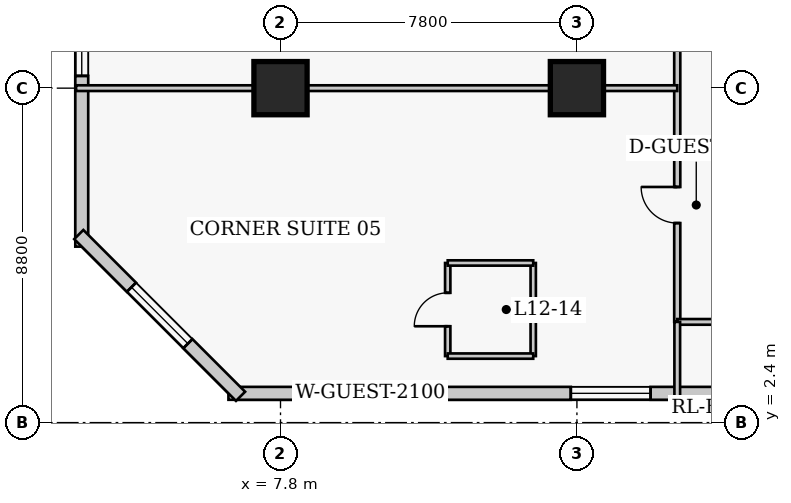
"""IFC4 building model, lengths in metres.
Left out: names, types, materials, properties, quantities, classifications, styles, units other than length and angle.
Written with IfcOpenShell. Run it as: python <this file> out.ifc"""

import sys

from ifc_helpers import new_model, si_unit, direction, frame, frame_2d, origin, origin_2d, place, context, subcontext, project, spatial, rectangle, extrude, element, fill, save


model = new_model("IFC4")
c1 = context("Model", 3, precision=1e-05, world=origin(), true_north=direction((0.0, 1.0)))
c2 = subcontext(c1, "Body", "Model", "MODEL_VIEW")
j1 = project(units=[si_unit("LENGTHUNIT", "METRE"), si_unit("PLANEANGLEUNIT", "RADIAN")], contexts=[c1])
p1 = place(None, origin())
s1 = spatial("IfcSite", under=j1, at=p1, CompositionType="ELEMENT")
p2 = place(p1, origin())
s2 = spatial("IfcBuilding", under=s1, at=p2, CompositionType="ELEMENT")
p3 = place(p2, frame((0.0, 0.0, 52.6)))
s3 = spatial("IfcBuildingStorey", under=s2, at=p3, CompositionType="ELEMENT", Elevation=52.6)
for number, where, z_axis, x_axis in (
    (1, (7.8, 11.2, 0.0), (0.0, 0.0, 1.0), (1.0, 0.0, 0.0)),
    (2, (15.6, 11.2, 0.0), (0.0, 0.0, 1.0), (1.0, 0.0, 0.0)),
):
    element("IfcColumn", number, at=place(p3, frame(where, z_axis=z_axis, x_axis=x_axis)), inside=s3, PredefinedType="COLUMN", context=c2, shape_type="SweptSolid", body=[
        extrude(rectangle(XDim=1.4, YDim=1.4, at=origin_2d()), origin(), (0.0, 0.0, 1.0), 3.8),
    ])
p4 = place(p3, frame((6.43, 3.17, 0.0), z_axis=(0.0, 0.0, 1.0), x_axis=(1.0, 0.0, 0.0)))
e3 = element("IfcWall", 3, at=p4, inside=s3, PredefinedType="SOLIDWALL", context=c2, shape_type="SweptSolid", body=[
    extrude(rectangle(XDim=29.89, YDim=0.34, at=frame_2d((14.945, 0.0))), origin(), (0.0, 0.0, 1.0), 3.54),
])
p5 = place(p4, frame((19.42, 0.0, 0.0)))
e4 = element("IfcOpeningElement", 4, at=p5, cuts=e3, PredefinedType="OPENING", context=c2, shape_type="SweptSolid", body=[
    extrude(rectangle(XDim=1.4, YDim=2.15, at=frame_2d((0.7, 1.075))), frame((0.0, 0.18, 0.0), z_axis=(0.0, -1.0, 0.0), x_axis=(1.0, 0.0, 0.0)), (0.0, 0.0, 1.0), 0.36),
])
p6 = place(p4, frame((2.686, 0.0, 0.85)))
e5 = element("IfcOpeningElement", 5, at=p6, cuts=e3, PredefinedType="OPENING", context=c2, shape_type="SweptSolid", body=[
    extrude(rectangle(XDim=2.1, YDim=1.85, at=frame_2d((1.05, 0.925))), frame((0.0, 0.18, 0.0), z_axis=(0.0, -1.0, 0.0), x_axis=(1.0, 0.0, 0.0)), (0.0, 0.0, 1.0), 0.36),
])
p7 = place(p4, frame((9.009, 0.0, 0.85)))
e6 = element("IfcOpeningElement", 6, at=p7, cuts=e3, PredefinedType="OPENING", context=c2, shape_type="SweptSolid", body=[
    extrude(rectangle(XDim=2.1, YDim=1.85, at=frame_2d((1.05, 0.925))), frame((0.0, 0.18, 0.0), z_axis=(0.0, -1.0, 0.0), x_axis=(1.0, 0.0, 0.0)), (0.0, 0.0, 1.0), 0.36),
])
p8 = place(p4, frame((25.104, 0.0, 0.85)))
e7 = element("IfcOpeningElement", 7, at=p8, cuts=e3, PredefinedType="OPENING", context=c2, shape_type="SweptSolid", body=[
    extrude(rectangle(XDim=2.1, YDim=1.85, at=frame_2d((1.05, 0.925))), frame((0.0, 0.18, 0.0), z_axis=(0.0, -1.0, 0.0), x_axis=(1.0, 0.0, 0.0)), (0.0, 0.0, 1.0), 0.36),
])
p9 = place(p3, frame((2.57, 42.17, 0.0), z_axis=(0.0, 0.0, 1.0), x_axis=(0.0, -1.0, 0.0)))
e8 = element("IfcWall", 8, at=p9, inside=s3, PredefinedType="SOLIDWALL", context=c2, shape_type="SweptSolid", body=[
    extrude(rectangle(XDim=35.14, YDim=0.34, at=frame_2d((17.57, 0.0))), origin(), (0.0, 0.0, 1.0), 3.54),
])
p10 = place(p9, frame((3.343, 0.0, 0.85)))
e9 = element("IfcOpeningElement", 9, at=p10, cuts=e8, PredefinedType="OPENING", context=c2, shape_type="SweptSolid", body=[
    extrude(rectangle(XDim=2.1, YDim=1.85, at=frame_2d((1.05, 0.925))), frame((0.0, 0.18, 0.0), z_axis=(0.0, -1.0, 0.0), x_axis=(1.0, 0.0, 0.0)), (0.0, 0.0, 1.0), 0.36),
])
p11 = place(p9, frame((10.978, 0.0, 0.85)))
e10 = element("IfcOpeningElement", 10, at=p11, cuts=e8, PredefinedType="OPENING", context=c2, shape_type="SweptSolid", body=[
    extrude(rectangle(XDim=2.1, YDim=1.85, at=frame_2d((1.05, 0.925))), frame((0.0, 0.18, 0.0), z_axis=(0.0, -1.0, 0.0), x_axis=(1.0, 0.0, 0.0)), (0.0, 0.0, 1.0), 0.36),
])
p12 = place(p9, frame((19.762, 0.0, 0.85)))
e11 = element("IfcOpeningElement", 11, at=p12, cuts=e8, PredefinedType="OPENING", context=c2, shape_type="SweptSolid", body=[
    extrude(rectangle(XDim=2.1, YDim=1.85, at=frame_2d((1.05, 0.925))), frame((0.0, 0.18, 0.0), z_axis=(0.0, -1.0, 0.0), x_axis=(1.0, 0.0, 0.0)), (0.0, 0.0, 1.0), 0.36),
])
p13 = place(p9, frame((28.548, 0.0, 0.85)))
e12 = element("IfcOpeningElement", 12, at=p13, cuts=e8, PredefinedType="OPENING", context=c2, shape_type="SweptSolid", body=[
    extrude(rectangle(XDim=2.1, YDim=1.85, at=frame_2d((1.05, 0.925))), frame((0.0, 0.18, 0.0), z_axis=(0.0, -1.0, 0.0), x_axis=(1.0, 0.0, 0.0)), (0.0, 0.0, 1.0), 0.36),
])
p14 = place(p3, frame((2.492, 7.348, 0.0), z_axis=(0.0, 0.0, 1.0), x_axis=(0.707106781187, -0.707106781187, 0.0)))
e13 = element("IfcWall", 13, at=p14, inside=s3, PredefinedType="SOLIDWALL", context=c2, shape_type="SweptSolid", body=[
    extrude(rectangle(XDim=6.02, YDim=0.34, at=frame_2d((3.01, 0.0))), origin(), (0.0, 0.0, 1.0), 3.54),
])
p15 = place(p14, frame((1.96, 0.0, 0.85)))
e14 = element("IfcOpeningElement", 14, at=p15, cuts=e13, PredefinedType="OPENING", context=c2, shape_type="SweptSolid", body=[
    extrude(rectangle(XDim=2.1, YDim=1.85, at=frame_2d((1.05, 0.925))), frame((0.0, 0.18, 0.0), z_axis=(0.0, -1.0, 0.0), x_axis=(1.0, 0.0, 0.0)), (0.0, 0.0, 1.0), 0.36),
])
p16 = place(p3, frame((18.24, 5.05, 0.0), z_axis=(0.0, 0.0, 1.0), x_axis=(0.0, 1.0, 0.0)))
e15 = element("IfcWall", 15, at=p16, inside=s3, PredefinedType="PARTITIONING", context=c2, shape_type="SweptSolid", body=[
    extrude(rectangle(XDim=35.6, YDim=0.16, at=frame_2d((17.8, 0.0))), origin(), (0.0, 0.0, 1.0), 3.54),
])
p17 = place(p16, frame((2.6, 0.0, 0.0)))
e16 = element("IfcOpeningElement", 16, at=p17, cuts=e15, PredefinedType="OPENING", context=c2, shape_type="SweptSolid", body=[
    extrude(rectangle(XDim=0.95, YDim=2.1, at=frame_2d((0.475, 1.05))), frame((0.0, 0.09, 0.0), z_axis=(0.0, -1.0, 0.0), x_axis=(1.0, 0.0, 0.0)), (0.0, 0.0, 1.0), 0.18),
])
p18 = place(p16, frame((10.075, 0.0, 0.0)))
e17 = element("IfcOpeningElement", 17, at=p18, cuts=e15, PredefinedType="OPENING", context=c2, shape_type="SweptSolid", body=[
    extrude(rectangle(XDim=0.95, YDim=2.1, at=frame_2d((0.475, 1.05))), frame((0.0, 0.09, 0.0), z_axis=(0.0, -1.0, 0.0), x_axis=(1.0, 0.0, 0.0)), (0.0, 0.0, 1.0), 0.18),
])
p19 = place(p16, frame((18.875, 0.0, 0.0)))
e18 = element("IfcOpeningElement", 18, at=p19, cuts=e15, PredefinedType="OPENING", context=c2, shape_type="SweptSolid", body=[
    extrude(rectangle(XDim=0.95, YDim=2.1, at=frame_2d((0.475, 1.05))), frame((0.0, 0.09, 0.0), z_axis=(0.0, -1.0, 0.0), x_axis=(1.0, 0.0, 0.0)), (0.0, 0.0, 1.0), 0.18),
])
p20 = place(p16, frame((26.575, 0.0, 0.0)))
e19 = element("IfcOpeningElement", 19, at=p20, cuts=e15, PredefinedType="OPENING", context=c2, shape_type="SweptSolid", body=[
    extrude(rectangle(XDim=0.95, YDim=2.1, at=frame_2d((0.475, 1.05))), frame((0.0, 0.09, 0.0), z_axis=(0.0, -1.0, 0.0), x_axis=(1.0, 0.0, 0.0)), (0.0, 0.0, 1.0), 0.18),
])
p21 = place(p16, frame((32.53, 0.0, 0.0)))
e20 = element("IfcOpeningElement", 20, at=p21, cuts=e15, PredefinedType="OPENING", context=c2, shape_type="SweptSolid", body=[
    extrude(rectangle(XDim=1.0, YDim=2.15, at=frame_2d((0.5, 1.075))), frame((0.0, 0.09, 0.0), z_axis=(0.0, -1.0, 0.0), x_axis=(1.0, 0.0, 0.0)), (0.0, 0.0, 1.0), 0.18),
])
p22 = place(p3, frame((18.24, 5.05, 0.0), z_axis=(0.0, 0.0, 1.0), x_axis=(1.0, 0.0, 0.0)))
e21 = element("IfcWall", 21, at=p22, inside=s3, PredefinedType="PARTITIONING", context=c2, shape_type="SweptSolid", body=[
    extrude(rectangle(XDim=2.22, YDim=0.15, at=frame_2d((1.11, 0.0))), origin(), (0.0, 0.0, 1.0), 3.54),
])
p23 = place(p3, frame((18.24, 3.02, 0.0), z_axis=(0.0, 0.0, 1.0), x_axis=(0.0, 1.0, 0.0)))
e22 = element("IfcWall", 22, at=p23, inside=s3, PredefinedType="PARTITIONING", context=c2, shape_type="SweptSolid", body=[
    extrude(rectangle(XDim=2.03, YDim=0.15, at=frame_2d((1.015, 0.0))), origin(), (0.0, 0.0, 1.0), 3.54),
])
p24 = place(p3, frame((12.2, 4.15, 0.0), z_axis=(0.0, 0.0, 1.0), x_axis=(0.0, 1.0, 0.0)))
e23 = element("IfcWall", 23, at=p24, inside=s3, PredefinedType="PLUMBINGWALL", context=c2, shape_type="SweptSolid", body=[
    extrude(rectangle(XDim=2.45, YDim=0.14, at=frame_2d((1.225, 0.0))), origin(), (0.0, 0.0, 1.0), 3.54),
])
p25 = place(p24, frame((0.785, 0.0, 0.0)))
e24 = element("IfcOpeningElement", 24, at=p25, cuts=e23, PredefinedType="OPENING", context=c2, shape_type="SweptSolid", body=[
    extrude(rectangle(XDim=0.88, YDim=2.05, at=frame_2d((0.44, 1.025))), frame((0.0, 0.08, 0.0), z_axis=(0.0, -1.0, 0.0), x_axis=(1.0, 0.0, 0.0)), (0.0, 0.0, 1.0), 0.16),
])
p26 = place(p3, frame((14.45, 4.15, 0.0), z_axis=(0.0, 0.0, 1.0), x_axis=(0.0, 1.0, 0.0)))
e25 = element("IfcWall", 25, at=p26, inside=s3, PredefinedType="PLUMBINGWALL", context=c2, shape_type="SweptSolid", body=[
    extrude(rectangle(XDim=2.45, YDim=0.14, at=frame_2d((1.225, 0.0))), origin(), (0.0, 0.0, 1.0), 3.54),
])
for number, where, z_axis, x_axis in (
    (26, (12.2, 4.15, 0.0), (0.0, 0.0, 1.0), (1.0, 0.0, 0.0)),
    (27, (12.2, 6.6, 0.0), (0.0, 0.0, 1.0), (1.0, 0.0, 0.0)),
):
    element("IfcWall", number, at=place(p3, frame(where, z_axis=z_axis, x_axis=x_axis)), inside=s3, PredefinedType="PLUMBINGWALL", context=c2, shape_type="SweptSolid", body=[
        extrude(rectangle(XDim=2.25, YDim=0.14, at=frame_2d((1.125, 0.0))), origin(), (0.0, 0.0, 1.0), 3.54),
    ])
p27 = place(p3, frame((2.42, 11.2, 0.0), z_axis=(0.0, 0.0, 1.0), x_axis=(1.0, 0.0, 0.0)))
e28 = element("IfcWall", 28, at=p27, inside=s3, PredefinedType="PARTITIONING", context=c2, shape_type="SweptSolid", body=[
    extrude(rectangle(XDim=15.82, YDim=0.15, at=frame_2d((7.91, 0.0))), origin(), (0.0, 0.0, 1.0), 2.593),
])
p28 = place(p6, origin())
e29 = element("IfcWindow", 29, at=p28, inside=s3, PartitioningType="SINGLE_PANEL", PredefinedType="WINDOW", context=c2, shape_type="SweptSolid", body=[
    extrude(rectangle(XDim=2.1, YDim=1.85, at=frame_2d((1.05, 0.925))), frame((0.0, 0.03, 0.0), z_axis=(0.0, -1.0, 0.0), x_axis=(1.0, 0.0, 0.0)), (0.0, 0.0, 1.0), 0.06),
])
fill(e5, e29)
p29 = place(p7, origin())
e30 = element("IfcWindow", 30, at=p29, inside=s3, PartitioningType="SINGLE_PANEL", PredefinedType="WINDOW", context=c2, shape_type="SweptSolid", body=[
    extrude(rectangle(XDim=2.1, YDim=1.85, at=frame_2d((1.05, 0.925))), frame((0.0, 0.03, 0.0), z_axis=(0.0, -1.0, 0.0), x_axis=(1.0, 0.0, 0.0)), (0.0, 0.0, 1.0), 0.06),
])
fill(e6, e30)
p30 = place(p13, origin())
e31 = element("IfcWindow", 31, at=p30, inside=s3, PartitioningType="SINGLE_PANEL", PredefinedType="WINDOW", context=c2, shape_type="SweptSolid", body=[
    extrude(rectangle(XDim=2.1, YDim=1.85, at=frame_2d((1.05, 0.925))), frame((0.0, 0.03, 0.0), z_axis=(0.0, -1.0, 0.0), x_axis=(1.0, 0.0, 0.0)), (0.0, 0.0, 1.0), 0.06),
])
fill(e12, e31)
p31 = place(p15, origin())
e32 = element("IfcWindow", 32, at=p31, inside=s3, PartitioningType="SINGLE_PANEL", PredefinedType="WINDOW", context=c2, shape_type="SweptSolid", body=[
    extrude(rectangle(XDim=2.1, YDim=1.85, at=frame_2d((1.05, 0.925))), frame((0.0, 0.03, 0.0), z_axis=(0.0, -1.0, 0.0), x_axis=(1.0, 0.0, 0.0)), (0.0, 0.0, 1.0), 0.06),
])
fill(e14, e32)
p32 = place(p25, origin())
e33 = element("IfcDoor", 33, at=p32, inside=s3, OperationType="SINGLE_SWING_LEFT", PredefinedType="DOOR", context=c2, shape_type="SweptSolid", body=[
    extrude(rectangle(XDim=0.88, YDim=2.05, at=frame_2d((0.44, 1.025))), frame((0.0, 0.025, 0.0), z_axis=(0.0, -1.0, 0.0), x_axis=(1.0, 0.0, 0.0)), (0.0, 0.0, 1.0), 0.05),
])
fill(e24, e33)
p33 = place(p17, origin())
e34 = element("IfcDoor", 34, at=p33, inside=s3, OperationType="SINGLE_SWING_RIGHT", PredefinedType="DOOR", context=c2, shape_type="SweptSolid", body=[
    extrude(rectangle(XDim=0.95, YDim=2.1, at=frame_2d((0.475, 1.05))), frame((0.0, 0.025, 0.0), z_axis=(0.0, -1.0, 0.0), x_axis=(1.0, 0.0, 0.0)), (0.0, 0.0, 1.0), 0.05),
])
fill(e16, e34)
save(model, sys.argv[1])
